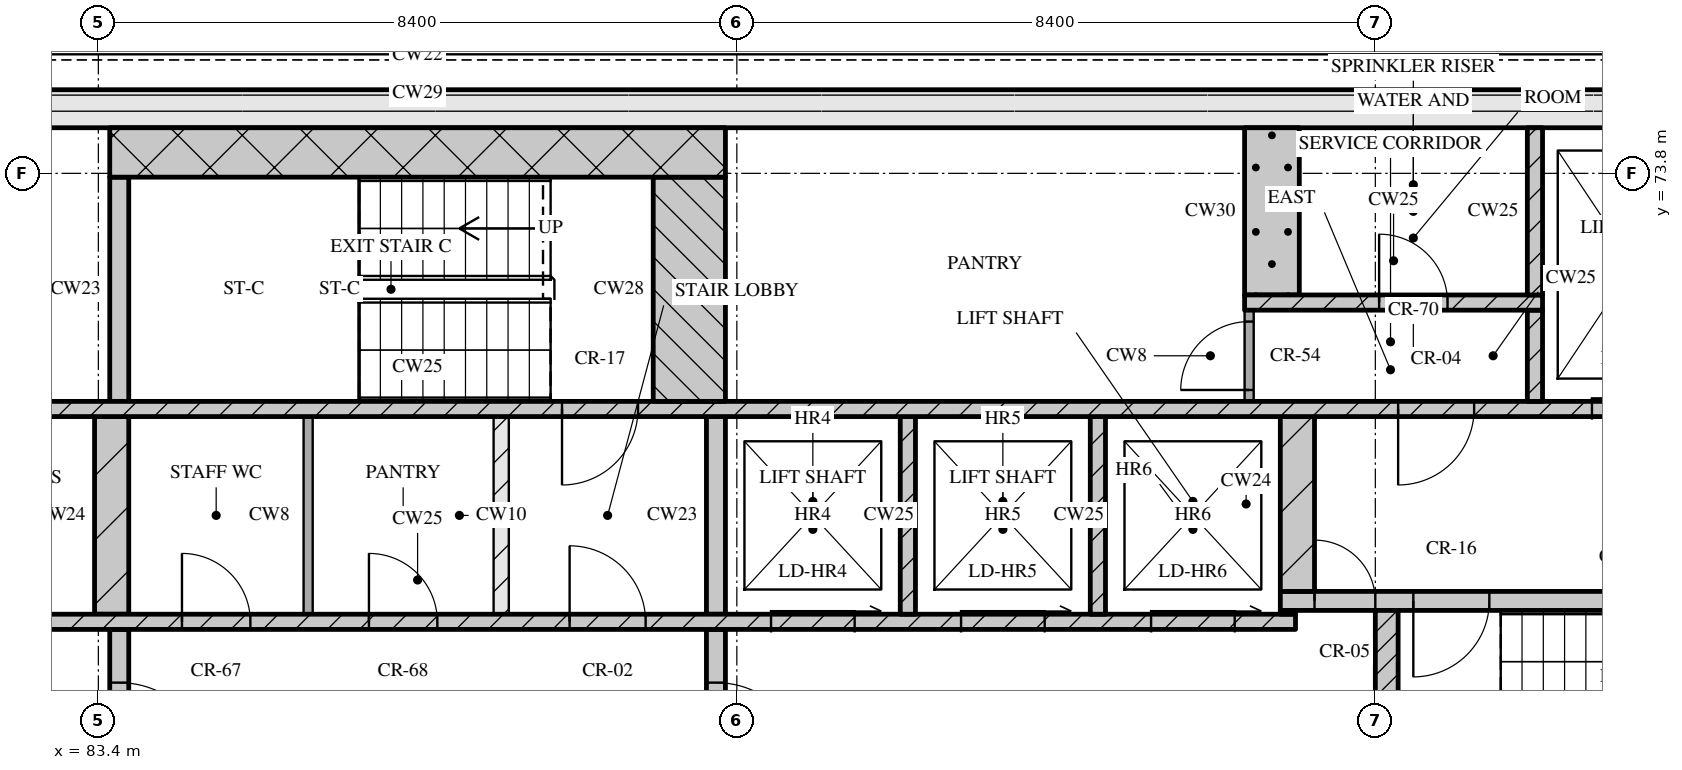
"""IFC4 building model, lengths in metres.
Left out: names, types, materials, properties, quantities, classifications, styles, units other than length and angle.
Written with IfcOpenShell. Run it as: python <this file> out.ifc"""

import sys

from ifc_helpers import new_model, si_unit, direction, frame, frame_2d, origin, place, context, subcontext, project, spatial, rectangle, extrude, element, fill, save


model = new_model("IFC4")
c1 = context("Model", 3, precision=1e-05, world=origin(), true_north=direction((0.0, 1.0)))
c2 = subcontext(c1, "Body", "Model", "MODEL_VIEW")
j1 = project(units=[si_unit("LENGTHUNIT", "METRE"), si_unit("PLANEANGLEUNIT", "RADIAN")], contexts=[c1])
p1 = place(None, origin())
s1 = spatial("IfcSite", under=j1, at=p1, CompositionType="ELEMENT")
p2 = place(p1, origin())
s2 = spatial("IfcBuilding", under=s1, at=p2, CompositionType="ELEMENT")
p3 = place(p2, frame((0.0, 0.0, 285.15)))
s3 = spatial("IfcBuildingStorey", under=s2, at=p3, CompositionType="ELEMENT", Elevation=285.15)
p4 = place(p3, frame((67.3, 74.65, 0.0), z_axis=(0.0, 0.0, 1.0), x_axis=(1.0, 0.0, 0.0)))
e1 = element("IfcWall", 1, at=p4, inside=s3, PredefinedType="SOLIDWALL", context=c2, shape_type="SweptSolid", body=[
    extrude(rectangle(XDim=40.6, YDim=0.5, at=frame_2d((20.3, 0.0))), origin(), (0.0, 0.0, 1.0), 3.32),
])
p5 = place(p3, frame((83.675, 65.2, 0.0), z_axis=(0.0, 0.0, 1.0), x_axis=(0.0, 1.0, 0.0)))
e2 = element("IfcWall", 2, at=p5, inside=s3, PredefinedType="SOLIDWALL", context=c2, shape_type="SweptSolid", body=[
    extrude(rectangle(XDim=2.6, YDim=0.25, at=frame_2d((1.3, 0.0))), origin(), (0.0, 0.0, 1.0), 3.32),
])
p6 = place(p5, frame((0.7, 0.0, 0.0)))
e3 = element("IfcOpeningElement", 3, at=p6, cuts=e2, PredefinedType="OPENING", context=c2, shape_type="SweptSolid", body=[
    extrude(rectangle(XDim=1.2, YDim=2.1, at=frame_2d((0.6, 1.05))), frame((0.0, 0.135, 0.0), z_axis=(0.0, -1.0, 0.0), x_axis=(1.0, 0.0, 0.0)), (0.0, 0.0, 1.0), 0.27),
])
p7 = place(p3, frame((91.525, 65.2, 0.0), z_axis=(0.0, 0.0, 1.0), x_axis=(0.0, 1.0, 0.0)))
e4 = element("IfcWall", 4, at=p7, inside=s3, PredefinedType="SOLIDWALL", context=c2, shape_type="SweptSolid", body=[
    extrude(rectangle(XDim=2.6, YDim=0.25, at=frame_2d((1.3, 0.0))), origin(), (0.0, 0.0, 1.0), 3.32),
])
p8 = place(p7, frame((0.7, 0.0, 0.0)))
e5 = element("IfcOpeningElement", 5, at=p8, cuts=e4, PredefinedType="OPENING", context=c2, shape_type="SweptSolid", body=[
    extrude(rectangle(XDim=1.2, YDim=2.1, at=frame_2d((0.6, 1.05))), frame((0.0, 0.135, 0.0), z_axis=(0.0, -1.0, 0.0), x_axis=(1.0, 0.0, 0.0)), (0.0, 0.0, 1.0), 0.27),
])
p9 = place(p3, frame((100.35, 65.2, 0.0), z_axis=(0.0, 0.0, 1.0), x_axis=(0.0, 1.0, 0.0)))
e6 = element("IfcWall", 6, at=p9, inside=s3, PredefinedType="SOLIDWALL", context=c2, shape_type="SweptSolid", body=[
    extrude(rectangle(XDim=2.85, YDim=0.3, at=frame_2d((1.425, 0.0))), origin(), (0.0, 0.0, 1.0), 3.32),
])
p10 = place(p3, frame((76.05, 67.9, 0.0), z_axis=(0.0, 0.0, 1.0), x_axis=(1.0, 0.0, 0.0)))
e7 = element("IfcWall", 7, at=p10, inside=s3, PredefinedType="SOLIDWALL", context=c2, shape_type="SweptSolid", body=[
    extrude(rectangle(XDim=23.1, YDim=0.2, at=frame_2d((11.55, 0.0))), origin(), (0.0, 0.0, 1.0), 3.32),
])
p11 = place(p10, frame((0.75, 0.0, 0.0)))
e8 = element("IfcOpeningElement", 8, at=p11, cuts=e7, PredefinedType="OPENING", context=c2, shape_type="SweptSolid", body=[
    extrude(rectangle(XDim=0.9, YDim=2.1, at=frame_2d((0.45, 1.05))), frame((0.0, 0.11, 0.0), z_axis=(0.0, -1.0, 0.0), x_axis=(1.0, 0.0, 0.0)), (0.0, 0.0, 1.0), 0.22),
])
p12 = place(p10, frame((3.32, 0.0, 0.0)))
e9 = element("IfcOpeningElement", 9, at=p12, cuts=e7, PredefinedType="OPENING", context=c2, shape_type="SweptSolid", body=[
    extrude(rectangle(XDim=0.9, YDim=2.1, at=frame_2d((0.45, 1.05))), frame((0.0, 0.11, 0.0), z_axis=(0.0, -1.0, 0.0), x_axis=(1.0, 0.0, 0.0)), (0.0, 0.0, 1.0), 0.22),
])
p13 = place(p10, frame((5.77, 0.0, 0.0)))
e10 = element("IfcOpeningElement", 10, at=p13, cuts=e7, PredefinedType="OPENING", context=c2, shape_type="SweptSolid", body=[
    extrude(rectangle(XDim=0.9, YDim=2.1, at=frame_2d((0.45, 1.05))), frame((0.0, 0.11, 0.0), z_axis=(0.0, -1.0, 0.0), x_axis=(1.0, 0.0, 0.0)), (0.0, 0.0, 1.0), 0.22),
])
p14 = place(p10, frame((8.45, 0.0, 0.0)))
e11 = element("IfcOpeningElement", 11, at=p14, cuts=e7, PredefinedType="OPENING", context=c2, shape_type="SweptSolid", body=[
    extrude(rectangle(XDim=0.9, YDim=2.1, at=frame_2d((0.45, 1.05))), frame((0.0, 0.11, 0.0), z_axis=(0.0, -1.0, 0.0), x_axis=(1.0, 0.0, 0.0)), (0.0, 0.0, 1.0), 0.22),
])
p15 = place(p10, frame((10.91, 0.0, 0.0)))
e12 = element("IfcOpeningElement", 12, at=p15, cuts=e7, PredefinedType="OPENING", context=c2, shape_type="SweptSolid", body=[
    extrude(rectangle(XDim=0.9, YDim=2.1, at=frame_2d((0.45, 1.05))), frame((0.0, 0.11, 0.0), z_axis=(0.0, -1.0, 0.0), x_axis=(1.0, 0.0, 0.0)), (0.0, 0.0, 1.0), 0.22),
])
p16 = place(p10, frame((13.55, 0.0, 0.0)))
e13 = element("IfcOpeningElement", 13, at=p16, cuts=e7, PredefinedType="OPENING", context=c2, shape_type="SweptSolid", body=[
    extrude(rectangle(XDim=1.0, YDim=2.1, at=frame_2d((0.5, 1.05))), frame((0.0, 0.11, 0.0), z_axis=(0.0, -1.0, 0.0), x_axis=(1.0, 0.0, 0.0)), (0.0, 0.0, 1.0), 0.22),
])
p17 = place(p10, frame((16.2, 0.0, 0.0)))
e14 = element("IfcOpeningElement", 14, at=p17, cuts=e7, PredefinedType="OPENING", context=c2, shape_type="SweptSolid", body=[
    extrude(rectangle(XDim=1.1, YDim=2.1, at=frame_2d((0.55, 1.05))), frame((0.0, 0.11, 0.0), z_axis=(0.0, -1.0, 0.0), x_axis=(1.0, 0.0, 0.0)), (0.0, 0.0, 1.0), 0.22),
])
p18 = place(p10, frame((18.7, 0.0, 0.0)))
e15 = element("IfcOpeningElement", 15, at=p18, cuts=e7, PredefinedType="OPENING", context=c2, shape_type="SweptSolid", body=[
    extrude(rectangle(XDim=1.1, YDim=2.1, at=frame_2d((0.55, 1.05))), frame((0.0, 0.11, 0.0), z_axis=(0.0, -1.0, 0.0), x_axis=(1.0, 0.0, 0.0)), (0.0, 0.0, 1.0), 0.22),
])
p19 = place(p10, frame((21.2, 0.0, 0.0)))
e16 = element("IfcOpeningElement", 16, at=p19, cuts=e7, PredefinedType="OPENING", context=c2, shape_type="SweptSolid", body=[
    extrude(rectangle(XDim=1.1, YDim=2.1, at=frame_2d((0.55, 1.05))), frame((0.0, 0.11, 0.0), z_axis=(0.0, -1.0, 0.0), x_axis=(1.0, 0.0, 0.0)), (0.0, 0.0, 1.0), 0.22),
])
p20 = place(p3, frame((83.575, 68.0, 0.0), z_axis=(0.0, 0.0, 1.0), x_axis=(0.0, 1.0, 0.0)))
e17 = element("IfcWall", 17, at=p20, inside=s3, PredefinedType="SOLIDWALL", context=c2, shape_type="SweptSolid", body=[
    extrude(rectangle(XDim=2.6, YDim=0.45, at=frame_2d((1.3, 0.0))), origin(), (0.0, 0.0, 1.0), 3.32),
])
p21 = place(p3, frame((86.16, 68.0, 0.0), z_axis=(0.0, 0.0, 1.0), x_axis=(0.0, 1.0, 0.0)))
e18 = element("IfcWall", 18, at=p21, inside=s3, PredefinedType="PARTITIONING", context=c2, shape_type="SweptSolid", body=[
    extrude(rectangle(XDim=2.6, YDim=0.12, at=frame_2d((1.3, 0.0))), origin(), (0.0, 0.0, 1.0), 3.32),
])
p22 = place(p3, frame((88.7, 68.0, 0.0), z_axis=(0.0, 0.0, 1.0), x_axis=(0.0, 1.0, 0.0)))
e19 = element("IfcWall", 19, at=p22, inside=s3, PredefinedType="PARTITIONING", context=c2, shape_type="SweptSolid", body=[
    extrude(rectangle(XDim=2.6, YDim=0.2, at=frame_2d((1.3, 0.0))), origin(), (0.0, 0.0, 1.0), 3.32),
])
p23 = place(p3, frame((91.525, 68.0, 0.0), z_axis=(0.0, 0.0, 1.0), x_axis=(0.0, 1.0, 0.0)))
e20 = element("IfcWall", 20, at=p23, inside=s3, PredefinedType="SOLIDWALL", context=c2, shape_type="SweptSolid", body=[
    extrude(rectangle(XDim=2.6, YDim=0.25, at=frame_2d((1.3, 0.0))), origin(), (0.0, 0.0, 1.0), 3.32),
])
for number, where, z_axis, x_axis in (
    (21, (94.05, 68.0, 0.0), (0.0, 0.0, 1.0), (0.0, 1.0, 0.0)),
    (22, (96.55, 68.0, 0.0), (0.0, 0.0, 1.0), (0.0, 1.0, 0.0)),
):
    element("IfcWall", number, at=place(p3, frame(where, z_axis=z_axis, x_axis=x_axis)), inside=s3, PredefinedType="SOLIDWALL", context=c2, shape_type="SweptSolid", body=[
        extrude(rectangle(XDim=2.6, YDim=0.2, at=frame_2d((1.3, 0.0))), origin(), (0.0, 0.0, 1.0), 3.32),
    ])
p24 = place(p3, frame((98.95, 68.025, 0.0), z_axis=(0.0, 0.0, 1.0), x_axis=(1.0, 0.0, 0.0)))
e23 = element("IfcWall", 23, at=p24, inside=s3, PredefinedType="SOLIDWALL", context=c2, shape_type="SweptSolid", body=[
    extrude(rectangle(XDim=0.2, YDim=0.05, at=frame_2d((0.1, 0.0))), origin(), (0.0, 0.0, 1.0), 3.32),
])
p25 = place(p3, frame((98.95, 68.175, 0.0), z_axis=(0.0, 0.0, 1.0), x_axis=(1.0, 0.0, 0.0)))
e24 = element("IfcWall", 24, at=p25, inside=s3, PredefinedType="SOLIDWALL", context=c2, shape_type="SweptSolid", body=[
    extrude(rectangle(XDim=8.45, YDim=0.25, at=frame_2d((4.225, 0.0))), origin(), (0.0, 0.0, 1.0), 3.32),
])
p26 = place(p25, frame((0.45, 0.0, 0.0)))
e25 = element("IfcOpeningElement", 25, at=p26, cuts=e24, PredefinedType="OPENING", context=c2, shape_type="SweptSolid", body=[
    extrude(rectangle(XDim=0.8, YDim=2.1, at=frame_2d((0.4, 1.05))), frame((0.0, 0.135, 0.0), z_axis=(0.0, -1.0, 0.0), x_axis=(1.0, 0.0, 0.0)), (0.0, 0.0, 1.0), 0.27),
])
p27 = place(p25, frame((1.75, 0.0, 0.0)))
e26 = element("IfcOpeningElement", 26, at=p27, cuts=e24, PredefinedType="OPENING", context=c2, shape_type="SweptSolid", body=[
    extrude(rectangle(XDim=1.0, YDim=2.1, at=frame_2d((0.5, 1.05))), frame((0.0, 0.135, 0.0), z_axis=(0.0, -1.0, 0.0), x_axis=(1.0, 0.0, 0.0)), (0.0, 0.0, 1.0), 0.27),
])
p28 = place(p3, frame((99.175, 68.3, 0.0), z_axis=(0.0, 0.0, 1.0), x_axis=(0.0, 1.0, 0.0)))
e27 = element("IfcWall", 27, at=p28, inside=s3, PredefinedType="SOLIDWALL", context=c2, shape_type="SweptSolid", body=[
    extrude(rectangle(XDim=2.3, YDim=0.45, at=frame_2d((1.15, 0.0))), origin(), (0.0, 0.0, 1.0), 3.32),
])
p29 = place(p3, frame((67.8, 70.7, 0.0), z_axis=(0.0, 0.0, 1.0), x_axis=(1.0, 0.0, 0.0)))
e28 = element("IfcWall", 28, at=p29, inside=s3, PredefinedType="SOLIDWALL", context=c2, shape_type="SweptSolid", body=[
    extrude(rectangle(XDim=39.6, YDim=0.2, at=frame_2d((19.8, 0.0))), origin(), (0.0, 0.0, 1.0), 3.32),
])
p30 = place(p29, frame((0.65, 0.0, 0.0)))
e29 = element("IfcOpeningElement", 29, at=p30, cuts=e28, PredefinedType="OPENING", context=c2, shape_type="SweptSolid", body=[
    extrude(rectangle(XDim=1.1, YDim=2.1, at=frame_2d((0.55, 1.05))), frame((0.0, 0.11, 0.0), z_axis=(0.0, -1.0, 0.0), x_axis=(1.0, 0.0, 0.0)), (0.0, 0.0, 1.0), 0.22),
])
p31 = place(p29, frame((3.25, 0.0, 0.0)))
e30 = element("IfcOpeningElement", 30, at=p31, cuts=e28, PredefinedType="OPENING", context=c2, shape_type="SweptSolid", body=[
    extrude(rectangle(XDim=1.1, YDim=2.1, at=frame_2d((0.55, 1.05))), frame((0.0, 0.11, 0.0), z_axis=(0.0, -1.0, 0.0), x_axis=(1.0, 0.0, 0.0)), (0.0, 0.0, 1.0), 0.22),
])
p32 = place(p29, frame((5.9, 0.0, 0.0)))
e31 = element("IfcOpeningElement", 31, at=p32, cuts=e28, PredefinedType="OPENING", context=c2, shape_type="SweptSolid", body=[
    extrude(rectangle(XDim=1.0, YDim=2.1, at=frame_2d((0.5, 1.05))), frame((0.0, 0.11, 0.0), z_axis=(0.0, -1.0, 0.0), x_axis=(1.0, 0.0, 0.0)), (0.0, 0.0, 1.0), 0.22),
])
p33 = place(p29, frame((21.7, 0.0, 0.0)))
e32 = element("IfcOpeningElement", 32, at=p33, cuts=e28, PredefinedType="OPENING", context=c2, shape_type="SweptSolid", body=[
    extrude(rectangle(XDim=1.0, YDim=2.1, at=frame_2d((0.5, 1.05))), frame((0.0, 0.11, 0.0), z_axis=(0.0, -1.0, 0.0), x_axis=(1.0, 0.0, 0.0)), (0.0, 0.0, 1.0), 0.22),
])
p34 = place(p29, frame((32.7, 0.0, 0.0)))
e33 = element("IfcOpeningElement", 33, at=p34, cuts=e28, PredefinedType="OPENING", context=c2, shape_type="SweptSolid", body=[
    extrude(rectangle(XDim=1.0, YDim=2.1, at=frame_2d((0.5, 1.05))), frame((0.0, 0.11, 0.0), z_axis=(0.0, -1.0, 0.0), x_axis=(1.0, 0.0, 0.0)), (0.0, 0.0, 1.0), 0.22),
])
p35 = place(p29, frame((35.25, 0.0, 0.0)))
e34 = element("IfcOpeningElement", 34, at=p35, cuts=e28, PredefinedType="OPENING", context=c2, shape_type="SweptSolid", body=[
    extrude(rectangle(XDim=1.1, YDim=2.1, at=frame_2d((0.55, 1.05))), frame((0.0, 0.11, 0.0), z_axis=(0.0, -1.0, 0.0), x_axis=(1.0, 0.0, 0.0)), (0.0, 0.0, 1.0), 0.22),
])
p36 = place(p29, frame((37.85, 0.0, 0.0)))
e35 = element("IfcOpeningElement", 35, at=p36, cuts=e28, PredefinedType="OPENING", context=c2, shape_type="SweptSolid", body=[
    extrude(rectangle(XDim=1.1, YDim=2.1, at=frame_2d((0.55, 1.05))), frame((0.0, 0.11, 0.0), z_axis=(0.0, -1.0, 0.0), x_axis=(1.0, 0.0, 0.0)), (0.0, 0.0, 1.0), 0.22),
])
p37 = place(p3, frame((83.675, 70.8, 0.0), z_axis=(0.0, 0.0, 1.0), x_axis=(0.0, 1.0, 0.0)))
e36 = element("IfcWall", 36, at=p37, inside=s3, PredefinedType="SOLIDWALL", context=c2, shape_type="SweptSolid", body=[
    extrude(rectangle(XDim=2.95, YDim=0.25, at=frame_2d((1.475, 0.0))), origin(), (0.0, 0.0, 1.0), 3.32),
])
p38 = place(p3, frame((91.175, 70.8, 0.0), z_axis=(0.0, 0.0, 1.0), x_axis=(0.0, 1.0, 0.0)))
e37 = element("IfcWall", 37, at=p38, inside=s3, PredefinedType="SOLIDWALL", context=c2, shape_type="SweptSolid", body=[
    extrude(rectangle(XDim=2.95, YDim=0.95, at=frame_2d((1.475, 0.0))), origin(), (0.0, 0.0, 1.0), 3.32),
])
p39 = place(p3, frame((98.54, 70.8, 0.0), z_axis=(0.0, 0.0, 1.0), x_axis=(0.0, 1.0, 0.0)))
e38 = element("IfcWall", 38, at=p39, inside=s3, PredefinedType="PARTITIONING", context=c2, shape_type="SweptSolid", body=[
    extrude(rectangle(XDim=1.2, YDim=0.12, at=frame_2d((0.6, 0.0))), origin(), (0.0, 0.0, 1.0), 3.32),
])
p40 = place(p39, frame((0.15, 0.0, 0.0)))
e39 = element("IfcOpeningElement", 39, at=p40, cuts=e38, PredefinedType="OPENING", context=c2, shape_type="SweptSolid", body=[
    extrude(rectangle(XDim=0.9, YDim=2.1, at=frame_2d((0.45, 1.05))), frame((0.0, 0.07, 0.0), z_axis=(0.0, -1.0, 0.0), x_axis=(1.0, 0.0, 0.0)), (0.0, 0.0, 1.0), 0.14),
])
p41 = place(p3, frame((102.3, 70.8, 0.0), z_axis=(0.0, 0.0, 1.0), x_axis=(0.0, 1.0, 0.0)))
e40 = element("IfcWall", 40, at=p41, inside=s3, PredefinedType="SOLIDWALL", context=c2, shape_type="SweptSolid", body=[
    extrude(rectangle(XDim=1.2, YDim=0.2, at=frame_2d((0.6, 0.0))), origin(), (0.0, 0.0, 1.0), 3.32),
])
p42 = place(p3, frame((98.48, 72.1, 0.0), z_axis=(0.0, 0.0, 1.0), x_axis=(1.0, 0.0, 0.0)))
e41 = element("IfcWall", 41, at=p42, inside=s3, PredefinedType="SOLIDWALL", context=c2, shape_type="SweptSolid", body=[
    extrude(rectangle(XDim=3.92, YDim=0.2, at=frame_2d((1.96, 0.0))), origin(), (0.0, 0.0, 1.0), 3.32),
])
p43 = place(p42, frame((1.77, 0.0, 0.0)))
e42 = element("IfcOpeningElement", 42, at=p43, cuts=e41, PredefinedType="OPENING", context=c2, shape_type="SweptSolid", body=[
    extrude(rectangle(XDim=0.9, YDim=2.1, at=frame_2d((0.45, 1.05))), frame((0.0, 0.11, 0.0), z_axis=(0.0, -1.0, 0.0), x_axis=(1.0, 0.0, 0.0)), (0.0, 0.0, 1.0), 0.22),
])
p44 = place(p3, frame((98.84, 72.2, 0.0), z_axis=(0.0, 0.0, 1.0), x_axis=(0.0, 1.0, 0.0)))
e43 = element("IfcWall", 43, at=p44, inside=s3, PredefinedType="SOLIDWALL", context=c2, shape_type="SweptSolid", body=[
    extrude(rectangle(XDim=2.2, YDim=0.72, at=frame_2d((1.1, 0.0))), origin(), (0.0, 0.0, 1.0), 3.32),
])
p45 = place(p3, frame((102.3, 72.2, 0.0), z_axis=(0.0, 0.0, 1.0), x_axis=(0.0, 1.0, 0.0)))
e44 = element("IfcWall", 44, at=p45, inside=s3, PredefinedType="SOLIDWALL", context=c2, shape_type="SweptSolid", body=[
    extrude(rectangle(XDim=2.2, YDim=0.2, at=frame_2d((1.1, 0.0))), origin(), (0.0, 0.0, 1.0), 3.32),
])
p46 = place(p3, frame((83.55, 74.075, 0.0), z_axis=(0.0, 0.0, 1.0), x_axis=(1.0, 0.0, 0.0)))
e45 = element("IfcWall", 45, at=p46, inside=s3, PredefinedType="SOLIDWALL", context=c2, shape_type="SweptSolid", body=[
    extrude(rectangle(XDim=8.1, YDim=0.65, at=frame_2d((4.05, 0.0))), origin(), (0.0, 0.0, 1.0), 3.32),
])
p47 = place(p6, origin())
e46 = element("IfcDoor", 46, at=p47, inside=s3, OperationType="SINGLE_SWING_RIGHT", PredefinedType="DOOR", context=c2, shape_type="SweptSolid", body=[
    extrude(rectangle(XDim=1.2, YDim=2.1, at=frame_2d((0.6, 1.05))), frame((0.0, 0.025, 0.0), z_axis=(0.0, -1.0, 0.0), x_axis=(1.0, 0.0, 0.0)), (0.0, 0.0, 1.0), 0.05),
])
fill(e3, e46)
p48 = place(p8, origin())
e47 = element("IfcDoor", 47, at=p48, inside=s3, OperationType="SINGLE_SWING_RIGHT", PredefinedType="DOOR", context=c2, shape_type="SweptSolid", body=[
    extrude(rectangle(XDim=1.2, YDim=2.1, at=frame_2d((0.6, 1.05))), frame((0.0, 0.025, 0.0), z_axis=(0.0, -1.0, 0.0), x_axis=(1.0, 0.0, 0.0)), (0.0, 0.0, 1.0), 0.05),
])
fill(e5, e47)
p49 = place(p14, origin())
e48 = element("IfcDoor", 48, at=p49, inside=s3, OperationType="SINGLE_SWING_LEFT", PredefinedType="DOOR", context=c2, shape_type="SweptSolid", body=[
    extrude(rectangle(XDim=0.9, YDim=2.1, at=frame_2d((0.45, 1.05))), frame((0.0, 0.025, 0.0), z_axis=(0.0, -1.0, 0.0), x_axis=(1.0, 0.0, 0.0)), (0.0, 0.0, 1.0), 0.05),
])
fill(e11, e48)
p50 = place(p15, origin())
e49 = element("IfcDoor", 49, at=p50, inside=s3, OperationType="SINGLE_SWING_LEFT", PredefinedType="DOOR", context=c2, shape_type="SweptSolid", body=[
    extrude(rectangle(XDim=0.9, YDim=2.1, at=frame_2d((0.45, 1.05))), frame((0.0, 0.025, 0.0), z_axis=(0.0, -1.0, 0.0), x_axis=(1.0, 0.0, 0.0)), (0.0, 0.0, 1.0), 0.05),
])
fill(e12, e49)
p51 = place(p16, origin())
e50 = element("IfcDoor", 50, at=p51, inside=s3, OperationType="SINGLE_SWING_LEFT", PredefinedType="DOOR", context=c2, shape_type="SweptSolid", body=[
    extrude(rectangle(XDim=1.0, YDim=2.1, at=frame_2d((0.5, 1.05))), frame((0.0, 0.025, 0.0), z_axis=(0.0, -1.0, 0.0), x_axis=(1.0, 0.0, 0.0)), (0.0, 0.0, 1.0), 0.05),
])
fill(e13, e50)
p52 = place(p17, origin())
e51 = element("IfcDoor", 51, at=p52, inside=s3, OperationType="SLIDING_TO_RIGHT", PredefinedType="DOOR", context=c2, shape_type="SweptSolid", body=[
    extrude(rectangle(XDim=1.1, YDim=2.1, at=frame_2d((0.55, 1.05))), frame((0.0, 0.025, 0.0), z_axis=(0.0, -1.0, 0.0), x_axis=(1.0, 0.0, 0.0)), (0.0, 0.0, 1.0), 0.05),
])
fill(e14, e51)
p53 = place(p18, origin())
e52 = element("IfcDoor", 52, at=p53, inside=s3, OperationType="SLIDING_TO_RIGHT", PredefinedType="DOOR", context=c2, shape_type="SweptSolid", body=[
    extrude(rectangle(XDim=1.1, YDim=2.1, at=frame_2d((0.55, 1.05))), frame((0.0, 0.025, 0.0), z_axis=(0.0, -1.0, 0.0), x_axis=(1.0, 0.0, 0.0)), (0.0, 0.0, 1.0), 0.05),
])
fill(e15, e52)
p54 = place(p19, origin())
e53 = element("IfcDoor", 53, at=p54, inside=s3, OperationType="SLIDING_TO_RIGHT", PredefinedType="DOOR", context=c2, shape_type="SweptSolid", body=[
    extrude(rectangle(XDim=1.1, YDim=2.1, at=frame_2d((0.55, 1.05))), frame((0.0, 0.025, 0.0), z_axis=(0.0, -1.0, 0.0), x_axis=(1.0, 0.0, 0.0)), (0.0, 0.0, 1.0), 0.05),
])
fill(e16, e53)
p55 = place(p26, origin())
e54 = element("IfcDoor", 54, at=p55, inside=s3, OperationType="SINGLE_SWING_LEFT", PredefinedType="DOOR", context=c2, shape_type="SweptSolid", body=[
    extrude(rectangle(XDim=0.8, YDim=2.1, at=frame_2d((0.4, 1.05))), frame((0.0, 0.025, 0.0), z_axis=(0.0, -1.0, 0.0), x_axis=(1.0, 0.0, 0.0)), (0.0, 0.0, 1.0), 0.05),
])
fill(e25, e54)
p56 = place(p27, origin())
e55 = element("IfcDoor", 55, at=p56, inside=s3, OperationType="SINGLE_SWING_RIGHT", PredefinedType="DOOR", context=c2, shape_type="SweptSolid", body=[
    extrude(rectangle(XDim=1.0, YDim=2.1, at=frame_2d((0.5, 1.05))), frame((0.0, 0.025, 0.0), z_axis=(0.0, -1.0, 0.0), x_axis=(1.0, 0.0, 0.0)), (0.0, 0.0, 1.0), 0.05),
])
fill(e26, e55)
p57 = place(p33, origin())
e56 = element("IfcDoor", 56, at=p57, inside=s3, OperationType="SINGLE_SWING_RIGHT", PredefinedType="DOOR", context=c2, shape_type="SweptSolid", body=[
    extrude(rectangle(XDim=1.0, YDim=2.1, at=frame_2d((0.5, 1.05))), frame((0.0, 0.025, 0.0), z_axis=(0.0, -1.0, 0.0), x_axis=(1.0, 0.0, 0.0)), (0.0, 0.0, 1.0), 0.05),
])
fill(e32, e56)
p58 = place(p34, origin())
e57 = element("IfcDoor", 57, at=p58, inside=s3, OperationType="SINGLE_SWING_RIGHT", PredefinedType="DOOR", context=c2, shape_type="SweptSolid", body=[
    extrude(rectangle(XDim=1.0, YDim=2.1, at=frame_2d((0.5, 1.05))), frame((0.0, 0.025, 0.0), z_axis=(0.0, -1.0, 0.0), x_axis=(1.0, 0.0, 0.0)), (0.0, 0.0, 1.0), 0.05),
])
fill(e33, e57)
p59 = place(p35, origin())
e58 = element("IfcDoor", 58, at=p59, inside=s3, OperationType="SLIDING_TO_RIGHT", PredefinedType="DOOR", context=c2, shape_type="SweptSolid", body=[
    extrude(rectangle(XDim=1.1, YDim=2.1, at=frame_2d((0.55, 1.05))), frame((0.0, 0.025, 0.0), z_axis=(0.0, -1.0, 0.0), x_axis=(1.0, 0.0, 0.0)), (0.0, 0.0, 1.0), 0.05),
])
fill(e34, e58)
p60 = place(p40, origin())
e59 = element("IfcDoor", 59, at=p60, inside=s3, OperationType="SINGLE_SWING_LEFT", PredefinedType="DOOR", context=c2, shape_type="SweptSolid", body=[
    extrude(rectangle(XDim=0.9, YDim=2.1, at=frame_2d((0.45, 1.05))), frame((0.0, 0.025, 0.0), z_axis=(0.0, -1.0, 0.0), x_axis=(1.0, 0.0, 0.0)), (0.0, 0.0, 1.0), 0.05),
])
fill(e39, e59)
p61 = place(p43, origin())
e60 = element("IfcDoor", 60, at=p61, inside=s3, OperationType="SINGLE_SWING_LEFT", PredefinedType="DOOR", context=c2, shape_type="SweptSolid", body=[
    extrude(rectangle(XDim=0.9, YDim=2.1, at=frame_2d((0.45, 1.05))), frame((0.0, 0.025, 0.0), z_axis=(0.0, -1.0, 0.0), x_axis=(1.0, 0.0, 0.0)), (0.0, 0.0, 1.0), 0.05),
])
fill(e42, e60)
save(model, sys.argv[1])
